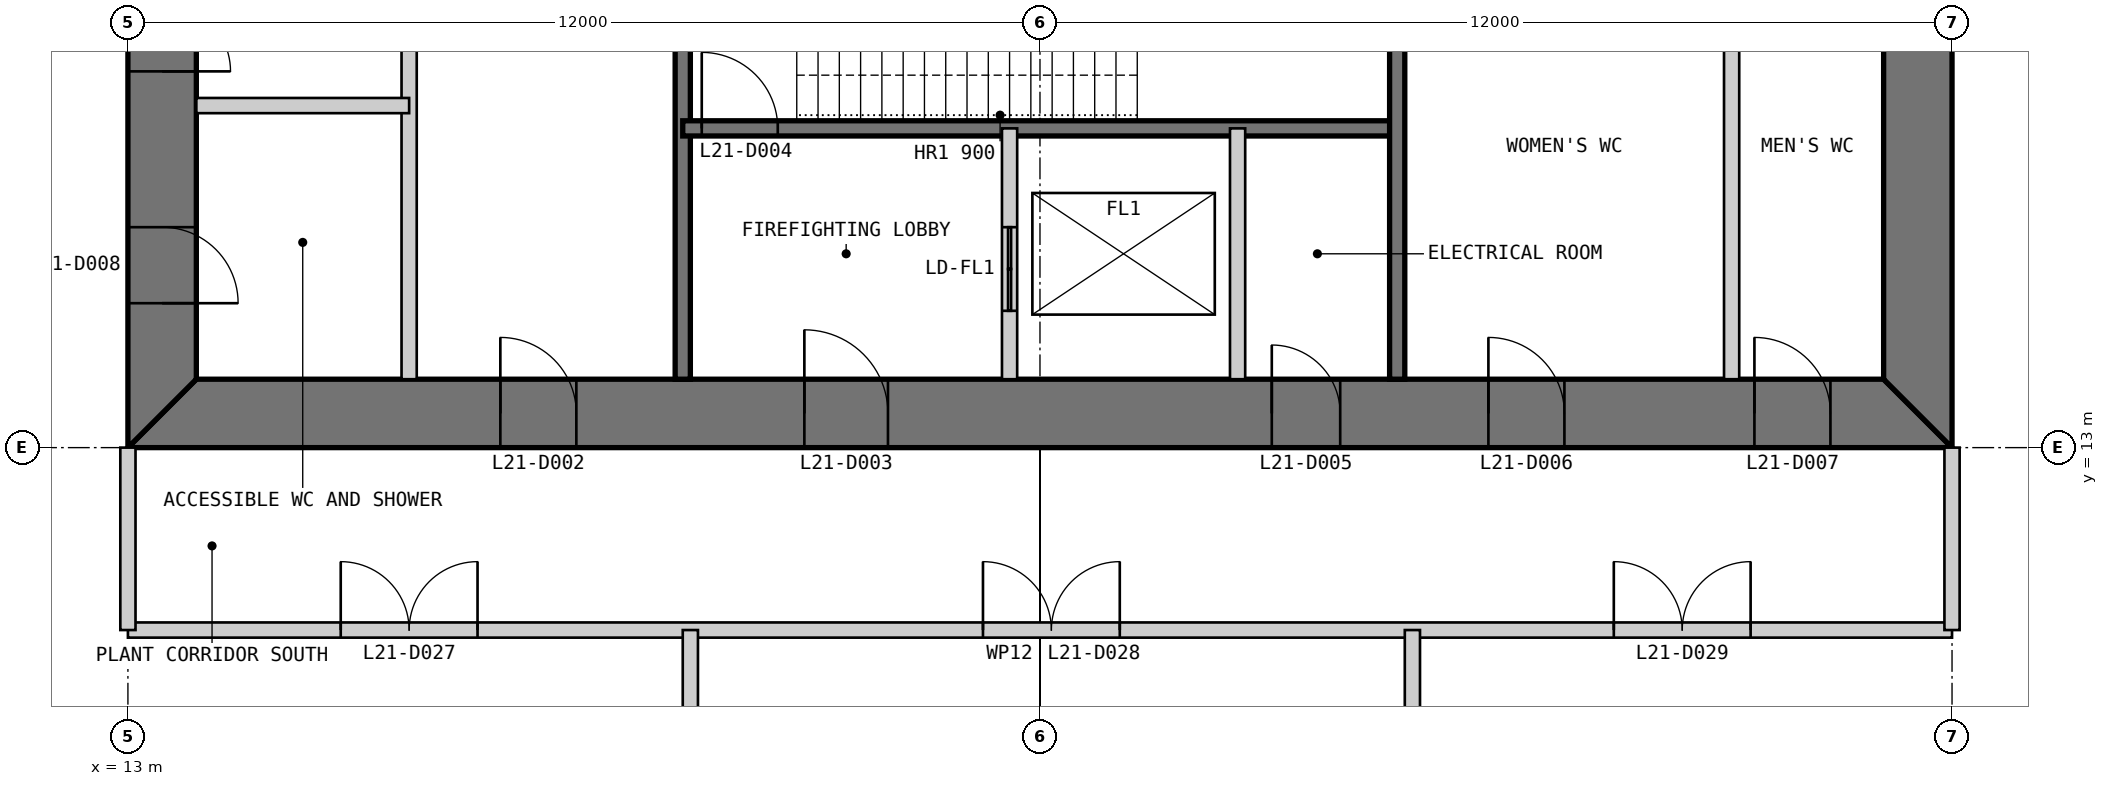
"""IFC4 building model, lengths in metres.
Left out: names, types, materials, properties, quantities, classifications, styles, units other than length and angle.
Written with IfcOpenShell. Run it as: python <this file> out.ifc"""

import sys

from ifc_helpers import new_model, si_unit, direction, frame, frame_2d, origin, place, context, subcontext, project, spatial, polyline, rectangle, outline, extrude, element, fill, save


model = new_model("IFC4")
c1 = context("Model", 3, precision=1e-05, world=origin(), true_north=direction((0.0, 1.0)))
c2 = subcontext(c1, "Body", "Model", "MODEL_VIEW")
j1 = project(units=[si_unit("LENGTHUNIT", "METRE"), si_unit("PLANEANGLEUNIT", "RADIAN")], contexts=[c1])
p1 = place(None, origin())
s1 = spatial("IfcSite", under=j1, at=p1, CompositionType="ELEMENT")
p2 = place(p1, origin())
s2 = spatial("IfcBuilding", under=s1, at=p2, CompositionType="ELEMENT")
p3 = place(p2, frame((0.0, 0.0, 91.0)))
s3 = spatial("IfcBuildingStorey", under=s2, at=p3, CompositionType="ELEMENT", Elevation=91.0)
p4 = place(p3, frame((13.0, 13.45, 0.0), z_axis=(0.0, 0.0, 1.0), x_axis=(1.0, 0.0, 0.0)))
e1 = element("IfcWall", 1, at=p4, inside=s3, PredefinedType="SHEAR", context=c2, shape_type="SweptSolid", body=[
    extrude(outline(polyline([(0.0, -0.45), (24.0, -0.45), (23.1, 0.45), (0.9, 0.45), (0.0, -0.45)])), origin(), (0.0, 0.0, 1.0), 6.0),
])
p5 = place(p4, frame((4.9, 0.0, 0.0)))
e2 = element("IfcOpeningElement", 2, at=p5, cuts=e1, PredefinedType="OPENING", context=c2, shape_type="SweptSolid", body=[
    extrude(rectangle(XDim=1.0, YDim=2.2, at=frame_2d((0.5, 1.1))), frame((0.0, 0.46, 0.0), z_axis=(0.0, -1.0, 0.0), x_axis=(1.0, 0.0, 0.0)), (0.0, 0.0, 1.0), 0.92),
])
p6 = place(p4, frame((8.9, 0.0, 0.0)))
e3 = element("IfcOpeningElement", 3, at=p6, cuts=e1, PredefinedType="OPENING", context=c2, shape_type="SweptSolid", body=[
    extrude(rectangle(XDim=1.1, YDim=2.2, at=frame_2d((0.55, 1.1))), frame((0.0, 0.46, 0.0), z_axis=(0.0, -1.0, 0.0), x_axis=(1.0, 0.0, 0.0)), (0.0, 0.0, 1.0), 0.92),
])
p7 = place(p4, frame((15.05, 0.0, 0.0)))
e4 = element("IfcOpeningElement", 4, at=p7, cuts=e1, PredefinedType="OPENING", context=c2, shape_type="SweptSolid", body=[
    extrude(rectangle(XDim=0.9, YDim=2.2, at=frame_2d((0.45, 1.1))), frame((0.0, 0.46, 0.0), z_axis=(0.0, -1.0, 0.0), x_axis=(1.0, 0.0, 0.0)), (0.0, 0.0, 1.0), 0.92),
])
p8 = place(p4, frame((17.9, 0.0, 0.0)))
e5 = element("IfcOpeningElement", 5, at=p8, cuts=e1, PredefinedType="OPENING", context=c2, shape_type="SweptSolid", body=[
    extrude(rectangle(XDim=1.0, YDim=2.2, at=frame_2d((0.5, 1.1))), frame((0.0, 0.46, 0.0), z_axis=(0.0, -1.0, 0.0), x_axis=(1.0, 0.0, 0.0)), (0.0, 0.0, 1.0), 0.92),
])
p9 = place(p4, frame((21.4, 0.0, 0.0)))
e6 = element("IfcOpeningElement", 6, at=p9, cuts=e1, PredefinedType="OPENING", context=c2, shape_type="SweptSolid", body=[
    extrude(rectangle(XDim=1.0, YDim=2.2, at=frame_2d((0.5, 1.1))), frame((0.0, 0.46, 0.0), z_axis=(0.0, -1.0, 0.0), x_axis=(1.0, 0.0, 0.0)), (0.0, 0.0, 1.0), 0.92),
])
p10 = place(p3, frame((36.55, 13.9, 0.0), z_axis=(0.0, 0.0, 1.0), x_axis=(0.0, 1.0, 0.0)))
e7 = element("IfcWall", 7, at=p10, inside=s3, PredefinedType="SHEAR", context=c2, shape_type="SweptSolid", body=[
    extrude(outline(polyline([(-0.9, -0.45), (23.1, -0.45), (22.2, 0.45), (0.0, 0.45), (-0.9, -0.45)])), origin(), (0.0, 0.0, 1.0), 6.0),
])
p11 = place(p10, frame((20.2, 0.0, 0.0)))
e8 = element("IfcOpeningElement", 8, at=p11, cuts=e7, PredefinedType="OPENING", context=c2, shape_type="SweptSolid", body=[
    extrude(rectangle(XDim=1.0, YDim=2.2, at=frame_2d((0.5, 1.1))), frame((0.0, 0.46, 0.0), z_axis=(0.0, -1.0, 0.0), x_axis=(1.0, 0.0, 0.0)), (0.0, 0.0, 1.0), 0.92),
])
p12 = place(p10, frame((17.25, 0.0, 0.0)))
e9 = element("IfcOpeningElement", 9, at=p12, cuts=e7, PredefinedType="OPENING", context=c2, shape_type="SweptSolid", body=[
    extrude(rectangle(XDim=0.9, YDim=2.2, at=frame_2d((0.45, 1.1))), frame((0.0, 0.46, 0.0), z_axis=(0.0, -1.0, 0.0), x_axis=(1.0, 0.0, 0.0)), (0.0, 0.0, 1.0), 0.92),
])
p13 = place(p3, frame((13.45, 36.1, 0.0), z_axis=(0.0, 0.0, 1.0), x_axis=(0.0, -1.0, 0.0)))
e10 = element("IfcWall", 10, at=p13, inside=s3, PredefinedType="SHEAR", context=c2, shape_type="SweptSolid", body=[
    extrude(outline(polyline([(-0.9, -0.45), (23.1, -0.45), (22.2, 0.45), (0.0, 0.45), (-0.9, -0.45)])), origin(), (0.0, 0.0, 1.0), 6.0),
])
p14 = place(p13, frame((20.2, 0.0, 0.0)))
e11 = element("IfcOpeningElement", 11, at=p14, cuts=e10, PredefinedType="OPENING", context=c2, shape_type="SweptSolid", body=[
    extrude(rectangle(XDim=1.0, YDim=2.2, at=frame_2d((0.5, 1.1))), frame((0.0, 0.46, 0.0), z_axis=(0.0, -1.0, 0.0), x_axis=(1.0, 0.0, 0.0)), (0.0, 0.0, 1.0), 0.92),
])
p15 = place(p13, frame((17.25, 0.0, 0.0)))
e12 = element("IfcOpeningElement", 12, at=p15, cuts=e10, PredefinedType="OPENING", context=c2, shape_type="SweptSolid", body=[
    extrude(rectangle(XDim=0.9, YDim=2.2, at=frame_2d((0.45, 1.1))), frame((0.0, 0.46, 0.0), z_axis=(0.0, -1.0, 0.0), x_axis=(1.0, 0.0, 0.0)), (0.0, 0.0, 1.0), 0.92),
])
p16 = place(p3, frame((16.7, 13.9, 0.0), z_axis=(0.0, 0.0, 1.0), x_axis=(0.0, 1.0, 0.0)))
e13 = element("IfcWall", 13, at=p16, inside=s3, PredefinedType="PARTITIONING", context=c2, shape_type="SweptSolid", body=[
    extrude(rectangle(XDim=16.1, YDim=0.2, at=frame_2d((8.05, 0.0))), origin(), (0.0, 0.0, 1.0), 5.8),
])
p17 = place(p3, frame((20.3, 13.9, 0.0), z_axis=(0.0, 0.0, 1.0), x_axis=(0.0, 1.0, 0.0)))
e14 = element("IfcWall", 14, at=p17, inside=s3, PredefinedType="SOLIDWALL", context=c2, shape_type="SweptSolid", body=[
    extrude(rectangle(XDim=16.1, YDim=0.2, at=frame_2d((8.05, 0.0))), origin(), (0.0, 0.0, 1.0), 5.8),
])
p18 = place(p3, frame((20.3, 17.2, 0.0), z_axis=(0.0, 0.0, 1.0), x_axis=(1.0, 0.0, 0.0)))
e15 = element("IfcWall", 15, at=p18, inside=s3, PredefinedType="SOLIDWALL", context=c2, shape_type="SweptSolid", body=[
    extrude(rectangle(XDim=9.4, YDim=0.2, at=frame_2d((4.7, 0.0))), origin(), (0.0, 0.0, 1.0), 5.8),
])
p19 = place(p18, frame((0.25, 0.0, 0.0)))
e16 = element("IfcOpeningElement", 16, at=p19, cuts=e15, PredefinedType="OPENING", context=c2, shape_type="SweptSolid", body=[
    extrude(rectangle(XDim=1.0, YDim=2.2, at=frame_2d((0.5, 1.1))), frame((0.0, 0.11, 0.0), z_axis=(0.0, -1.0, 0.0), x_axis=(1.0, 0.0, 0.0)), (0.0, 0.0, 1.0), 0.22),
])
p20 = place(p3, frame((24.6, 13.9, 0.0), z_axis=(0.0, 0.0, 1.0), x_axis=(0.0, 1.0, 0.0)))
e17 = element("IfcWall", 17, at=p20, inside=s3, PredefinedType="PARTITIONING", context=c2, shape_type="SweptSolid", body=[
    extrude(rectangle(XDim=3.3, YDim=0.2, at=frame_2d((1.65, 0.0))), origin(), (0.0, 0.0, 1.0), 5.8),
])
p21 = place(p20, frame((0.9, 0.0, 0.0)))
e18 = element("IfcOpeningElement", 18, at=p21, cuts=e17, PredefinedType="OPENING", context=c2, shape_type="SweptSolid", body=[
    extrude(rectangle(XDim=1.1, YDim=2.2, at=frame_2d((0.55, 1.1))), frame((0.0, 0.11, 0.0), z_axis=(0.0, -1.0, 0.0), x_axis=(1.0, 0.0, 0.0)), (0.0, 0.0, 1.0), 0.22),
])
p22 = place(p3, frame((27.6, 13.9, 0.0), z_axis=(0.0, 0.0, 1.0), x_axis=(0.0, 1.0, 0.0)))
e19 = element("IfcWall", 19, at=p22, inside=s3, PredefinedType="PARTITIONING", context=c2, shape_type="SweptSolid", body=[
    extrude(rectangle(XDim=3.3, YDim=0.2, at=frame_2d((1.65, 0.0))), origin(), (0.0, 0.0, 1.0), 5.8),
])
p23 = place(p3, frame((29.7, 13.9, 0.0), z_axis=(0.0, 0.0, 1.0), x_axis=(0.0, 1.0, 0.0)))
e20 = element("IfcWall", 20, at=p23, inside=s3, PredefinedType="SOLIDWALL", context=c2, shape_type="SweptSolid", body=[
    extrude(rectangle(XDim=6.1, YDim=0.2, at=frame_2d((3.05, 0.0))), origin(), (0.0, 0.0, 1.0), 5.8),
])
p24 = place(p3, frame((34.1, 13.9, 0.0), z_axis=(0.0, 0.0, 1.0), x_axis=(0.0, 1.0, 0.0)))
e21 = element("IfcWall", 21, at=p24, inside=s3, PredefinedType="PARTITIONING", context=c2, shape_type="SweptSolid", body=[
    extrude(rectangle(XDim=6.1, YDim=0.2, at=frame_2d((3.05, 0.0))), origin(), (0.0, 0.0, 1.0), 5.8),
])
p25 = place(p3, frame((13.9, 17.5, 0.0), z_axis=(0.0, 0.0, 1.0), x_axis=(1.0, 0.0, 0.0)))
e22 = element("IfcWall", 22, at=p25, inside=s3, PredefinedType="PARTITIONING", context=c2, shape_type="SweptSolid", body=[
    extrude(rectangle(XDim=2.8, YDim=0.2, at=frame_2d((1.4, 0.0))), origin(), (0.0, 0.0, 1.0), 5.8),
])
p26 = place(p3, frame((13.0, 10.6, 0.0), z_axis=(0.0, 0.0, 1.0), x_axis=(1.0, 0.0, 0.0)))
e23 = element("IfcWall", 23, at=p26, inside=s3, PredefinedType="PARTITIONING", context=c2, shape_type="SweptSolid", body=[
    extrude(rectangle(XDim=24.0, YDim=0.2, at=frame_2d((12.0, 0.0))), origin(), (0.0, 0.0, 1.0), 5.8),
])
p27 = place(p26, frame((2.8, 0.0, 0.0)))
e24 = element("IfcOpeningElement", 24, at=p27, cuts=e23, PredefinedType="OPENING", context=c2, shape_type="SweptSolid", body=[
    extrude(rectangle(XDim=1.8, YDim=2.4, at=frame_2d((0.9, 1.2))), frame((0.0, 0.11, 0.0), z_axis=(0.0, -1.0, 0.0), x_axis=(1.0, 0.0, 0.0)), (0.0, 0.0, 1.0), 0.22),
])
p28 = place(p26, frame((11.25, 0.0, 0.0)))
e25 = element("IfcOpeningElement", 25, at=p28, cuts=e23, PredefinedType="OPENING", context=c2, shape_type="SweptSolid", body=[
    extrude(rectangle(XDim=1.8, YDim=2.4, at=frame_2d((0.9, 1.2))), frame((0.0, 0.11, 0.0), z_axis=(0.0, -1.0, 0.0), x_axis=(1.0, 0.0, 0.0)), (0.0, 0.0, 1.0), 0.22),
])
p29 = place(p26, frame((19.55, 0.0, 0.0)))
e26 = element("IfcOpeningElement", 26, at=p29, cuts=e23, PredefinedType="OPENING", context=c2, shape_type="SweptSolid", body=[
    extrude(rectangle(XDim=1.8, YDim=2.4, at=frame_2d((0.9, 1.2))), frame((0.0, 0.11, 0.0), z_axis=(0.0, -1.0, 0.0), x_axis=(1.0, 0.0, 0.0)), (0.0, 0.0, 1.0), 0.22),
])
for number, where, z_axis, x_axis in (
    (27, (13.0, 10.6, 0.0), (0.0, 0.0, 1.0), (0.0, 1.0, 0.0)),
    (28, (37.0, 10.6, 0.0), (0.0, 0.0, 1.0), (0.0, 1.0, 0.0)),
):
    element("IfcWall", number, at=place(p3, frame(where, z_axis=z_axis, x_axis=x_axis)), inside=s3, PredefinedType="PARTITIONING", context=c2, shape_type="SweptSolid", body=[
        extrude(rectangle(XDim=2.4, YDim=0.2, at=frame_2d((1.2, 0.0))), origin(), (0.0, 0.0, 1.0), 4.853),
    ])
p30 = place(p3, frame((20.4, 2.0, 0.0), z_axis=(0.0, 0.0, 1.0), x_axis=(0.0, 1.0, 0.0)))
e29 = element("IfcWall", 29, at=p30, inside=s3, PredefinedType="PARTITIONING", context=c2, shape_type="SweptSolid", body=[
    extrude(rectangle(XDim=8.6, YDim=0.2, at=frame_2d((4.3, 0.0))), origin(), (0.0, 0.0, 1.0), 5.8),
])
p31 = place(p30, frame((3.4, 0.0, 0.0)))
e30 = element("IfcOpeningElement", 30, at=p31, cuts=e29, PredefinedType="OPENING", context=c2, shape_type="SweptSolid", body=[
    extrude(rectangle(XDim=1.8, YDim=2.4, at=frame_2d((0.9, 1.2))), frame((0.0, 0.11, 0.0), z_axis=(0.0, -1.0, 0.0), x_axis=(1.0, 0.0, 0.0)), (0.0, 0.0, 1.0), 0.22),
])
p32 = place(p3, frame((29.9, 2.0, 0.0), z_axis=(0.0, 0.0, 1.0), x_axis=(0.0, 1.0, 0.0)))
e31 = element("IfcWall", 31, at=p32, inside=s3, PredefinedType="PARTITIONING", context=c2, shape_type="SweptSolid", body=[
    extrude(rectangle(XDim=8.6, YDim=0.2, at=frame_2d((4.3, 0.0))), origin(), (0.0, 0.0, 1.0), 5.8),
])
p33 = place(p32, frame((3.4, 0.0, 0.0)))
e32 = element("IfcOpeningElement", 32, at=p33, cuts=e31, PredefinedType="OPENING", context=c2, shape_type="SweptSolid", body=[
    extrude(rectangle(XDim=1.8, YDim=2.4, at=frame_2d((0.9, 1.2))), frame((0.0, 0.11, 0.0), z_axis=(0.0, -1.0, 0.0), x_axis=(1.0, 0.0, 0.0)), (0.0, 0.0, 1.0), 0.22),
])
p34 = place(p5, origin())
e33 = element("IfcDoor", 33, at=p34, inside=s3, OperationType="SINGLE_SWING_LEFT", PredefinedType="DOOR", context=c2, shape_type="SweptSolid", body=[
    extrude(rectangle(XDim=1.0, YDim=2.2, at=frame_2d((0.5, 1.1))), frame((0.0, 0.025, 0.0), z_axis=(0.0, -1.0, 0.0), x_axis=(1.0, 0.0, 0.0)), (0.0, 0.0, 1.0), 0.05),
    extrude(outline(polyline([(0.0, 0.0), (0.04, 0.0), (0.04, 2.16), (0.96, 2.16), (0.96, 0.0), (1.0, 0.0), (1.0, 2.2), (0.0, 2.2), (0.0, 0.0)])), frame((0.0, 0.3, 0.0), z_axis=(0.0, -1.0, 0.0), x_axis=(1.0, 0.0, 0.0)), (0.0, 0.0, 1.0), 0.6),
])
fill(e2, e33)
p35 = place(p6, origin())
e34 = element("IfcDoor", 34, at=p35, inside=s3, OperationType="SINGLE_SWING_LEFT", PredefinedType="DOOR", context=c2, shape_type="SweptSolid", body=[
    extrude(rectangle(XDim=1.1, YDim=2.2, at=frame_2d((0.55, 1.1))), frame((0.0, 0.025, 0.0), z_axis=(0.0, -1.0, 0.0), x_axis=(1.0, 0.0, 0.0)), (0.0, 0.0, 1.0), 0.05),
    extrude(outline(polyline([(0.0, 0.0), (0.04, 0.0), (0.04, 2.16), (1.06, 2.16), (1.06, 0.0), (1.1, 0.0), (1.1, 2.2), (0.0, 2.2), (0.0, 0.0)])), frame((0.0, 0.3, 0.0), z_axis=(0.0, -1.0, 0.0), x_axis=(1.0, 0.0, 0.0)), (0.0, 0.0, 1.0), 0.6),
])
fill(e3, e34)
p36 = place(p19, origin())
e35 = element("IfcDoor", 35, at=p36, inside=s3, OperationType="SINGLE_SWING_LEFT", PredefinedType="DOOR", context=c2, shape_type="SweptSolid", body=[
    extrude(rectangle(XDim=1.0, YDim=2.2, at=frame_2d((0.5, 1.1))), frame((0.0, 0.025, 0.0), z_axis=(0.0, -1.0, 0.0), x_axis=(1.0, 0.0, 0.0)), (0.0, 0.0, 1.0), 0.05),
])
fill(e16, e35)
p37 = place(p7, origin())
e36 = element("IfcDoor", 36, at=p37, inside=s3, OperationType="SINGLE_SWING_LEFT", PredefinedType="DOOR", context=c2, shape_type="SweptSolid", body=[
    extrude(rectangle(XDim=0.9, YDim=2.2, at=frame_2d((0.45, 1.1))), frame((0.0, 0.025, 0.0), z_axis=(0.0, -1.0, 0.0), x_axis=(1.0, 0.0, 0.0)), (0.0, 0.0, 1.0), 0.05),
    extrude(outline(polyline([(0.0, 0.0), (0.04, 0.0), (0.04, 2.16), (0.86, 2.16), (0.86, 0.0), (0.9, 0.0), (0.9, 2.2), (0.0, 2.2), (0.0, 0.0)])), frame((0.0, 0.3, 0.0), z_axis=(0.0, -1.0, 0.0), x_axis=(1.0, 0.0, 0.0)), (0.0, 0.0, 1.0), 0.6),
])
fill(e4, e36)
p38 = place(p8, origin())
e37 = element("IfcDoor", 37, at=p38, inside=s3, OperationType="SINGLE_SWING_LEFT", PredefinedType="DOOR", context=c2, shape_type="SweptSolid", body=[
    extrude(rectangle(XDim=1.0, YDim=2.2, at=frame_2d((0.5, 1.1))), frame((0.0, 0.025, 0.0), z_axis=(0.0, -1.0, 0.0), x_axis=(1.0, 0.0, 0.0)), (0.0, 0.0, 1.0), 0.05),
    extrude(outline(polyline([(0.0, 0.0), (0.04, 0.0), (0.04, 2.16), (0.96, 2.16), (0.96, 0.0), (1.0, 0.0), (1.0, 2.2), (0.0, 2.2), (0.0, 0.0)])), frame((0.0, 0.3, 0.0), z_axis=(0.0, -1.0, 0.0), x_axis=(1.0, 0.0, 0.0)), (0.0, 0.0, 1.0), 0.6),
])
fill(e5, e37)
p39 = place(p9, origin())
e38 = element("IfcDoor", 38, at=p39, inside=s3, OperationType="SINGLE_SWING_LEFT", PredefinedType="DOOR", context=c2, shape_type="SweptSolid", body=[
    extrude(rectangle(XDim=1.0, YDim=2.2, at=frame_2d((0.5, 1.1))), frame((0.0, 0.025, 0.0), z_axis=(0.0, -1.0, 0.0), x_axis=(1.0, 0.0, 0.0)), (0.0, 0.0, 1.0), 0.05),
    extrude(outline(polyline([(0.0, 0.0), (0.04, 0.0), (0.04, 2.16), (0.96, 2.16), (0.96, 0.0), (1.0, 0.0), (1.0, 2.2), (0.0, 2.2), (0.0, 0.0)])), frame((0.0, 0.3, 0.0), z_axis=(0.0, -1.0, 0.0), x_axis=(1.0, 0.0, 0.0)), (0.0, 0.0, 1.0), 0.6),
])
fill(e6, e38)
p40 = place(p14, origin())
e39 = element("IfcDoor", 39, at=p40, inside=s3, OperationType="SINGLE_SWING_RIGHT", PredefinedType="DOOR", context=c2, shape_type="SweptSolid", body=[
    extrude(rectangle(XDim=1.0, YDim=2.2, at=frame_2d((0.5, 1.1))), frame((0.0, 0.025, 0.0), z_axis=(0.0, -1.0, 0.0), x_axis=(1.0, 0.0, 0.0)), (0.0, 0.0, 1.0), 0.05),
    extrude(outline(polyline([(0.0, 0.0), (0.04, 0.0), (0.04, 2.16), (0.96, 2.16), (0.96, 0.0), (1.0, 0.0), (1.0, 2.2), (0.0, 2.2), (0.0, 0.0)])), frame((0.0, 0.3, 0.0), z_axis=(0.0, -1.0, 0.0), x_axis=(1.0, 0.0, 0.0)), (0.0, 0.0, 1.0), 0.6),
])
fill(e11, e39)
p41 = place(p15, origin())
e40 = element("IfcDoor", 40, at=p41, inside=s3, OperationType="SINGLE_SWING_RIGHT", PredefinedType="DOOR", context=c2, shape_type="SweptSolid", body=[
    extrude(rectangle(XDim=0.9, YDim=2.2, at=frame_2d((0.45, 1.1))), frame((0.0, 0.025, 0.0), z_axis=(0.0, -1.0, 0.0), x_axis=(1.0, 0.0, 0.0)), (0.0, 0.0, 1.0), 0.05),
    extrude(outline(polyline([(0.0, 0.0), (0.04, 0.0), (0.04, 2.16), (0.86, 2.16), (0.86, 0.0), (0.9, 0.0), (0.9, 2.2), (0.0, 2.2), (0.0, 0.0)])), frame((0.0, 0.3, 0.0), z_axis=(0.0, -1.0, 0.0), x_axis=(1.0, 0.0, 0.0)), (0.0, 0.0, 1.0), 0.6),
])
fill(e12, e40)
p42 = place(p27, origin())
e41 = element("IfcDoor", 41, at=p42, inside=s3, OperationType="DOUBLE_DOOR_SINGLE_SWING", PredefinedType="DOOR", context=c2, shape_type="SweptSolid", body=[
    extrude(rectangle(XDim=1.8, YDim=2.4, at=frame_2d((0.9, 1.2))), frame((0.0, 0.025, 0.0), z_axis=(0.0, -1.0, 0.0), x_axis=(1.0, 0.0, 0.0)), (0.0, 0.0, 1.0), 0.05),
])
fill(e24, e41)
p43 = place(p28, origin())
e42 = element("IfcDoor", 42, at=p43, inside=s3, OperationType="DOUBLE_DOOR_SINGLE_SWING", PredefinedType="DOOR", context=c2, shape_type="SweptSolid", body=[
    extrude(rectangle(XDim=1.8, YDim=2.4, at=frame_2d((0.9, 1.2))), frame((0.0, 0.025, 0.0), z_axis=(0.0, -1.0, 0.0), x_axis=(1.0, 0.0, 0.0)), (0.0, 0.0, 1.0), 0.05),
])
fill(e25, e42)
p44 = place(p29, origin())
e43 = element("IfcDoor", 43, at=p44, inside=s3, OperationType="DOUBLE_DOOR_SINGLE_SWING", PredefinedType="DOOR", context=c2, shape_type="SweptSolid", body=[
    extrude(rectangle(XDim=1.8, YDim=2.4, at=frame_2d((0.9, 1.2))), frame((0.0, 0.025, 0.0), z_axis=(0.0, -1.0, 0.0), x_axis=(1.0, 0.0, 0.0)), (0.0, 0.0, 1.0), 0.05),
])
fill(e26, e43)
p45 = place(p21, origin())
e44 = element("IfcDoor", 44, at=p45, inside=s3, OperationType="DOUBLE_DOOR_SLIDING", PredefinedType="DOOR", context=c2, shape_type="SweptSolid", body=[
    extrude(rectangle(XDim=1.1, YDim=2.2, at=frame_2d((0.55, 1.1))), frame((0.0, 0.025, 0.0), z_axis=(0.0, -1.0, 0.0), x_axis=(1.0, 0.0, 0.0)), (0.0, 0.0, 1.0), 0.05),
])
fill(e18, e44)
save(model, sys.argv[1])
